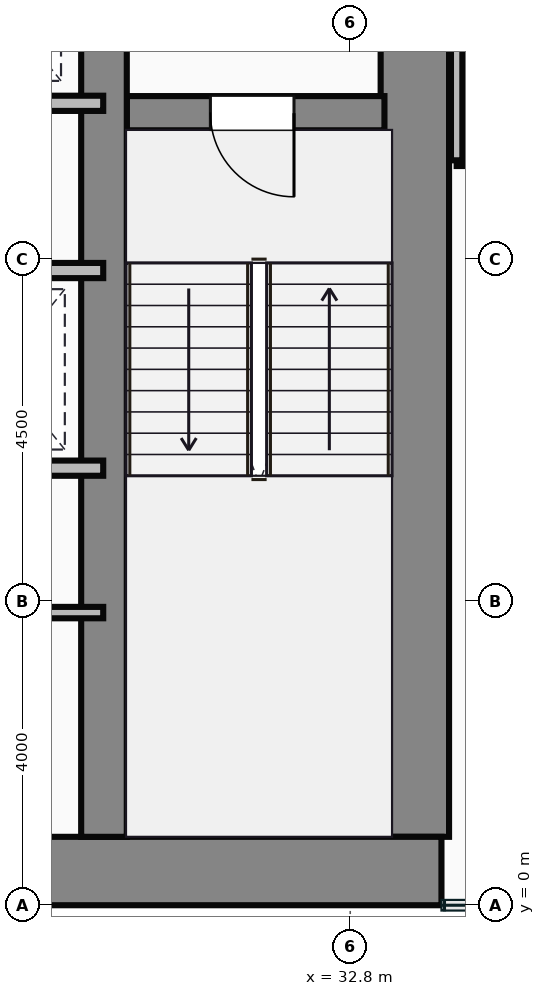
"""IFC4 building model, lengths in metres.
Left out: names, types, materials, properties, quantities, classifications, styles, units other than length and angle.
Written with IfcOpenShell. Run it as: python <this file> out.ifc"""

import sys

from ifc_helpers import new_model, si_unit, direction, frame, frame_2d, origin, place, context, subcontext, project, spatial, rectangle, extrude, source, transform, mapped, element, fill, save


model = new_model("IFC4")
c1 = context("Model", 3, precision=1e-05, world=origin(), true_north=direction((0.0, 1.0)))
c2 = subcontext(c1, "Body", "Model", "MODEL_VIEW")
j1 = project(units=[si_unit("LENGTHUNIT", "METRE"), si_unit("PLANEANGLEUNIT", "RADIAN")], contexts=[c1])
p1 = place(None, origin())
s1 = spatial("IfcSite", under=j1, at=p1, CompositionType="ELEMENT")
p2 = place(p1, origin())
s2 = spatial("IfcBuilding", under=s1, at=p2, CompositionType="ELEMENT")
p3 = place(p2, frame((0.0, 0.0, 47.1)))
s3 = spatial("IfcBuildingStorey", under=s2, at=p3, CompositionType="ELEMENT", Elevation=47.1)
m1 = source(origin(), c2, "Body", "SweptSolid", [
    extrude(rectangle(XDim=29.5, YDim=0.9, at=frame_2d((14.75, 0.0))), origin(), (0.0, 0.0, 1.0), 3.65),
])
p4 = place(p3, frame((4.5, 0.45, 0.0), z_axis=(0.0, 0.0, 1.0), x_axis=(1.0, 0.0, 0.0)))
e1 = element("IfcWall", 1, at=p4, inside=s3, PredefinedType="SHEAR", context=c2, shape_type="MappedRepresentation", body=[
    mapped(m1, transform((0.0, 0.0, 0.0))),
])
m2 = source(origin(), c2, "Body", "SweptSolid", [
    extrude(rectangle(XDim=13.1, YDim=0.9, at=frame_2d((6.55, 0.0))), origin(), (0.0, 0.0, 1.0), 3.65),
])
p5 = place(p3, frame((33.65, 0.9, 0.0), z_axis=(0.0, 0.0, 1.0), x_axis=(0.0, 1.0, 0.0)))
e2 = element("IfcWall", 2, at=p5, inside=s3, PredefinedType="SHEAR", context=c2, shape_type="MappedRepresentation", body=[
    mapped(m2, transform((0.0, 0.0, 0.0))),
])
m3 = source(origin(), c2, "Body", "SweptSolid", [
    extrude(rectangle(XDim=12.2, YDim=0.6, at=frame_2d((6.1, 0.0))), origin(), (0.0, 0.0, 1.0), 3.65),
])
p6 = place(p3, frame((29.56, 0.9, 0.0), z_axis=(0.0, 0.0, 1.0), x_axis=(0.0, 1.0, 0.0)))
e3 = element("IfcWall", 3, at=p6, inside=s3, PredefinedType="SHEAR", context=c2, shape_type="MappedRepresentation", body=[
    mapped(m3, transform((0.0, 0.0, 0.0))),
])
m4 = source(origin(), c2, "Body", "SweptSolid", [
    extrude(rectangle(XDim=3.39, YDim=0.45, at=frame_2d((1.695, 0.0))), origin(), (0.0, 0.0, 1.0), 3.65),
])
p7 = place(p3, frame((29.86, 10.42, 0.0), z_axis=(0.0, 0.0, 1.0), x_axis=(1.0, 0.0, 0.0)))
e4 = element("IfcWall", 4, at=p7, inside=s3, PredefinedType="SHEAR", context=c2, shape_type="MappedRepresentation", body=[
    mapped(m4, transform((0.0, 0.0, 0.0))),
])
p8 = place(p7, frame((1.1, 0.0, 0.0)))
e5 = element("IfcOpeningElement", 5, at=p8, cuts=e4, PredefinedType="OPENING", context=c2, shape_type="SweptSolid", body=[
    extrude(rectangle(XDim=1.1, YDim=2.15, at=frame_2d((0.55, 1.075))), frame((0.0, 0.235, 0.0), z_axis=(0.0, -1.0, 0.0), x_axis=(1.0, 0.0, 0.0)), (0.0, 0.0, 1.0), 0.47),
])
m5 = source(origin(), c2, "Body", "SweptSolid", [
    extrude(rectangle(XDim=8.8, YDim=0.2, at=frame_2d((4.4, 0.0))), origin(), (0.0, 0.0, 1.0), 3.4),
])
p9 = place(p3, frame((20.75, 10.55, 0.0), z_axis=(0.0, 0.0, 1.0), x_axis=(1.0, 0.0, 0.0)))
e6 = element("IfcWall", 6, at=p9, inside=s3, PredefinedType="PARTITIONING", context=c2, shape_type="MappedRepresentation", body=[
    mapped(m5, transform((0.0, 0.0, 0.0))),
])
m6 = source(origin(), c2, "Body", "SweptSolid", [
    extrude(rectangle(XDim=4.55, YDim=0.2, at=frame_2d((2.275, 0.0))), origin(), (0.0, 0.0, 1.0), 3.4),
])
for number, where, z_axis, x_axis in (
    (7, (25.0, 8.35, 0.0), (0.0, 0.0, 1.0), (1.0, 0.0, 0.0)),
    (8, (25.0, 5.75, 0.0), (0.0, 0.0, 1.0), (1.0, 0.0, 0.0)),
):
    element("IfcWall", number, at=place(p3, frame(where, z_axis=z_axis, x_axis=x_axis)), inside=s3, PredefinedType="PARTITIONING", context=c2, shape_type="MappedRepresentation", body=[
        mapped(m6, transform((0.0, 0.0, 0.0))),
    ])
m7 = source(origin(), c2, "Body", "SweptSolid", [
    extrude(rectangle(XDim=4.55, YDim=0.15, at=frame_2d((2.275, 0.0))), origin(), (0.0, 0.0, 1.0), 3.4),
])
p10 = place(p3, frame((25.0, 3.85, 0.0), z_axis=(0.0, 0.0, 1.0), x_axis=(1.0, 0.0, 0.0)))
e9 = element("IfcWall", 9, at=p10, inside=s3, PredefinedType="PARTITIONING", context=c2, shape_type="MappedRepresentation", body=[
    mapped(m7, transform((0.0, 0.0, 0.0))),
])
m8 = source(origin(), c2, "Body", "SweptSolid", [
    extrude(rectangle(XDim=4.8, YDim=0.15, at=frame_2d((2.4, 0.0))), origin(), (0.0, 0.0, 1.0), 3.4),
])
p11 = place(p3, frame((34.2, 9.8, 0.0), z_axis=(0.0, 0.0, 1.0), x_axis=(1.0, 0.0, 0.0)))
e10 = element("IfcWall", 10, at=p11, inside=s3, PredefinedType="PARTITIONING", context=c2, shape_type="MappedRepresentation", body=[
    mapped(m8, transform((0.0, 0.0, 0.0))),
])
m9 = source(origin(), c2, "Body", "SweptSolid", [
    extrude(rectangle(XDim=4.18, YDim=0.15, at=frame_2d((2.09, 0.0))), origin(), (0.0, 0.0, 1.0), 3.4),
])
p12 = place(p3, frame((34.2, 9.8, 0.0), z_axis=(0.0, 0.0, 1.0), x_axis=(0.0, 1.0, 0.0)))
e11 = element("IfcWall", 11, at=p12, inside=s3, PredefinedType="PARTITIONING", context=c2, shape_type="MappedRepresentation", body=[
    mapped(m9, transform((0.0, 0.0, 0.0))),
])
m10 = source(origin(), c2, "Body", "SweptSolid", [
    extrude(rectangle(XDim=1.1, YDim=2.15, at=frame_2d((0.55, 1.075))), frame((0.0, 0.025, 0.0), z_axis=(0.0, -1.0, 0.0), x_axis=(1.0, 0.0, 0.0)), (0.0, 0.0, 1.0), 0.05),
])
p13 = place(p8, frame((1.1, 0.0, 0.0), z_axis=(0.0, 0.0, 1.0), x_axis=(-1.0, 0.0, 0.0)))
e12 = element("IfcDoor", 12, at=p13, inside=s3, OperationType="SINGLE_SWING_RIGHT", PredefinedType="DOOR", context=c2, shape_type="MappedRepresentation", body=[
    mapped(m10, transform((0.0, 0.0, 0.0))),
])
fill(e5, e12)
save(model, sys.argv[1])
